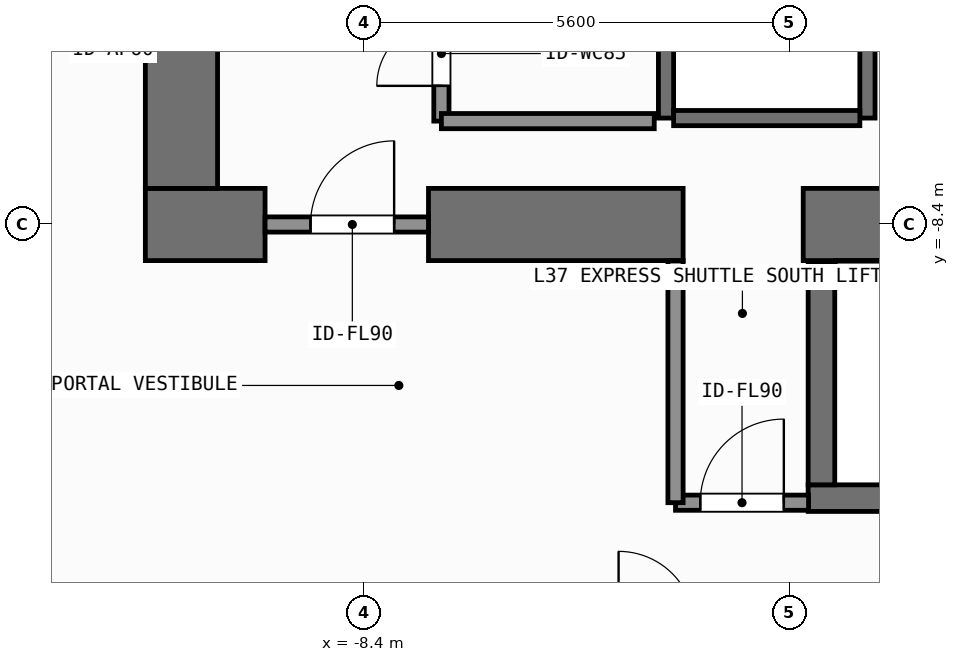
"""IFC4 building model, lengths in metres.
Left out: names, types, materials, properties, quantities, classifications, styles, units other than length and angle.
Written with IfcOpenShell. Run it as: python <this file> out.ifc"""

import sys

from ifc_helpers import new_model, si_unit, direction, frame, frame_2d, origin, place, context, subcontext, project, spatial, rectangle, extrude, element, fill, save


model = new_model("IFC4")
c1 = context("Model", 3, precision=1e-05, world=origin(), true_north=direction((0.0, 1.0)))
c2 = subcontext(c1, "Body", "Model", "MODEL_VIEW")
j1 = project(units=[si_unit("LENGTHUNIT", "METRE"), si_unit("PLANEANGLEUNIT", "RADIAN")], contexts=[c1])
p1 = place(None, origin())
s1 = spatial("IfcSite", under=j1, at=p1, CompositionType="ELEMENT")
p2 = place(p1, origin())
s2 = spatial("IfcBuilding", under=s1, at=p2, CompositionType="ELEMENT")
p3 = place(p2, frame((0.0, 0.0, 148.5)))
s3 = spatial("IfcBuildingStorey", under=s2, at=p3, CompositionType="ELEMENT", Elevation=148.5)
p4 = place(p3, frame((-11.275, -8.4, 0.0), z_axis=(0.0, 0.0, 1.0), x_axis=(1.0, 0.0, 0.0)))
e1 = element("IfcWall", 1, at=p4, inside=s3, PredefinedType="SHEAR", context=c2, shape_type="SweptSolid", body=[
    extrude(rectangle(XDim=1.575, YDim=0.95, at=frame_2d((0.788, 0.0))), origin(), (0.0, 0.0, 1.0), 3.9),
])
p5 = place(p3, frame((-7.55, -8.4, 0.0), z_axis=(0.0, 0.0, 1.0), x_axis=(1.0, 0.0, 0.0)))
e2 = element("IfcWall", 2, at=p5, inside=s3, PredefinedType="SHEAR", context=c2, shape_type="SweptSolid", body=[
    extrude(rectangle(XDim=3.35, YDim=0.95, at=frame_2d((1.675, 0.0))), origin(), (0.0, 0.0, 1.0), 3.9),
])
p6 = place(p3, frame((-2.62, -8.4, 0.0), z_axis=(0.0, 0.0, 1.0), x_axis=(1.0, 0.0, 0.0)))
e3 = element("IfcWall", 3, at=p6, inside=s3, PredefinedType="SHEAR", context=c2, shape_type="SweptSolid", body=[
    extrude(rectangle(XDim=7.27, YDim=0.95, at=frame_2d((3.635, 0.0))), origin(), (0.0, 0.0, 1.0), 3.9),
])
p7 = place(p3, frame((-10.8, -7.925, 0.0), z_axis=(0.0, 0.0, 1.0), x_axis=(0.0, 1.0, 0.0)))
e4 = element("IfcWall", 4, at=p7, inside=s3, PredefinedType="SHEAR", context=c2, shape_type="SweptSolid", body=[
    extrude(rectangle(XDim=15.85, YDim=0.95, at=frame_2d((7.925, 0.0))), origin(), (0.0, 0.0, 1.0), 3.9),
])
p8 = place(p3, frame((-2.555, -12.0, 0.0), z_axis=(0.0, 0.0, 1.0), x_axis=(1.0, 0.0, 0.0)))
e5 = element("IfcWall", 5, at=p8, inside=s3, PredefinedType="SHEAR", context=c2, shape_type="SweptSolid", body=[
    extrude(rectangle(XDim=7.31, YDim=0.35, at=frame_2d((3.655, 0.0))), origin(), (0.0, 0.0, 1.0), 3.9),
])
p9 = place(p3, frame((-2.2, -8.95, 0.0), z_axis=(0.0, 0.0, 1.0), x_axis=(1.0, 0.0, 0.0)))
e6 = element("IfcWall", 6, at=p9, inside=s3, PredefinedType="SHEAR", context=c2, shape_type="SweptSolid", body=[
    extrude(rectangle(XDim=6.6, YDim=0.15, at=frame_2d((3.3, 0.0))), origin(), (0.0, 0.0, 1.0), 3.9),
])
p10 = place(p3, frame((-2.38, -11.825, 0.0), z_axis=(0.0, 0.0, 1.0), x_axis=(0.0, 1.0, 0.0)))
e7 = element("IfcWall", 7, at=p10, inside=s3, PredefinedType="SHEAR", context=c2, shape_type="SweptSolid", body=[
    extrude(rectangle(XDim=2.925, YDim=0.35, at=frame_2d((1.462, 0.0))), origin(), (0.0, 0.0, 1.0), 3.9),
])
for number, where, z_axis, x_axis in (
    (8, (-4.425, -7.0, 0.0), (0.0, 0.0, 1.0), (0.0, 1.0, 0.0)),
    (9, (-1.775, -7.0, 0.0), (0.0, 0.0, 1.0), (0.0, 1.0, 0.0)),
):
    element("IfcWall", number, at=place(p3, frame(where, z_axis=z_axis, x_axis=x_axis)), inside=s3, PredefinedType="SHEAR", context=c2, shape_type="SweptSolid", body=[
        extrude(rectangle(XDim=2.8, YDim=0.2, at=frame_2d((1.4, 0.0))), origin(), (0.0, 0.0, 1.0), 3.68),
    ])
p11 = place(p3, frame((-4.325, -7.0, 0.0), z_axis=(0.0, 0.0, 1.0), x_axis=(1.0, 0.0, 0.0)))
e10 = element("IfcWall", 10, at=p11, inside=s3, PredefinedType="SHEAR", context=c2, shape_type="SweptSolid", body=[
    extrude(rectangle(XDim=2.45, YDim=0.2, at=frame_2d((1.225, 0.0))), origin(), (0.0, 0.0, 1.0), 3.68),
])
p12 = place(p3, frame((-9.7, -8.4, 0.0), z_axis=(0.0, 0.0, 1.0), x_axis=(1.0, 0.0, 0.0)))
e11 = element("IfcWall", 11, at=p12, inside=s3, PredefinedType="SOLIDWALL", context=c2, shape_type="SweptSolid", body=[
    extrude(rectangle(XDim=2.15, YDim=0.2, at=frame_2d((1.075, 0.0))), origin(), (0.0, 0.0, 1.0), 2.72),
])
p13 = place(p12, frame((0.598, 0.0, 0.0)))
e12 = element("IfcOpeningElement", 12, at=p13, cuts=e11, PredefinedType="OPENING", context=c2, shape_type="SweptSolid", body=[
    extrude(rectangle(XDim=1.1, YDim=2.15, at=frame_2d((0.55, 1.075))), frame((0.0, 0.11, 0.0), z_axis=(0.0, -1.0, 0.0), x_axis=(1.0, 0.0, 0.0)), (0.0, 0.0, 1.0), 0.22),
])
p14 = place(p3, frame((-4.3, -12.06, 0.0), z_axis=(0.0, 0.0, 1.0), x_axis=(1.0, 0.0, 0.0)))
e13 = element("IfcWall", 13, at=p14, inside=s3, PredefinedType="SOLIDWALL", context=c2, shape_type="SweptSolid", body=[
    extrude(rectangle(XDim=1.75, YDim=0.2, at=frame_2d((0.875, 0.0))), origin(), (0.0, 0.0, 1.0), 3.68),
])
p15 = place(p14, frame((0.325, 0.0, 0.0)))
e14 = element("IfcOpeningElement", 14, at=p15, cuts=e13, PredefinedType="OPENING", context=c2, shape_type="SweptSolid", body=[
    extrude(rectangle(XDim=1.1, YDim=2.15, at=frame_2d((0.55, 1.075))), frame((0.0, 0.11, 0.0), z_axis=(0.0, -1.0, 0.0), x_axis=(1.0, 0.0, 0.0)), (0.0, 0.0, 1.0), 0.22),
])
p16 = place(p3, frame((-7.38, -7.04, 0.0), z_axis=(0.0, 0.0, 1.0), x_axis=(0.0, 1.0, 0.0)))
e15 = element("IfcWall", 15, at=p16, inside=s3, PredefinedType="SOLIDWALL", context=c2, shape_type="SweptSolid", body=[
    extrude(rectangle(XDim=1.93, YDim=0.2, at=frame_2d((0.965, 0.0))), origin(), (0.0, 0.0, 1.0), 3.68),
])
p17 = place(p16, frame((0.464, 0.0, 0.0)))
e16 = element("IfcOpeningElement", 16, at=p17, cuts=e15, PredefinedType="OPENING", context=c2, shape_type="SweptSolid", body=[
    extrude(rectangle(XDim=0.85, YDim=2.1, at=frame_2d((0.425, 1.05))), frame((0.0, 0.11, 0.0), z_axis=(0.0, -1.0, 0.0), x_axis=(1.0, 0.0, 0.0)), (0.0, 0.0, 1.0), 0.22),
])
p18 = place(p3, frame((-4.3, -12.06, 0.0), z_axis=(0.0, 0.0, 1.0), x_axis=(0.0, 1.0, 0.0)))
e17 = element("IfcWall", 17, at=p18, inside=s3, PredefinedType="SOLIDWALL", context=c2, shape_type="SweptSolid", body=[
    extrude(rectangle(XDim=3.185, YDim=0.2, at=frame_2d((1.593, 0.0))), origin(), (0.0, 0.0, 1.0), 3.68),
])
p19 = place(p3, frame((-7.38, -7.04, 0.0), z_axis=(0.0, 0.0, 1.0), x_axis=(1.0, 0.0, 0.0)))
e18 = element("IfcWall", 18, at=p19, inside=s3, PredefinedType="SOLIDWALL", context=c2, shape_type="SweptSolid", body=[
    extrude(rectangle(XDim=2.8, YDim=0.2, at=frame_2d((1.4, 0.0))), origin(), (0.0, 0.0, 1.0), 3.68),
])
p20 = place(p13, origin())
e19 = element("IfcDoor", 19, at=p20, inside=s3, OperationType="SINGLE_SWING_RIGHT", PredefinedType="DOOR", context=c2, shape_type="SweptSolid", body=[
    extrude(rectangle(XDim=1.1, YDim=2.15, at=frame_2d((0.55, 1.075))), frame((0.0, 0.025, 0.0), z_axis=(0.0, -1.0, 0.0), x_axis=(1.0, 0.0, 0.0)), (0.0, 0.0, 1.0), 0.05),
])
fill(e12, e19)
p21 = place(p15, origin())
e20 = element("IfcDoor", 20, at=p21, inside=s3, OperationType="SINGLE_SWING_RIGHT", PredefinedType="DOOR", context=c2, shape_type="SweptSolid", body=[
    extrude(rectangle(XDim=1.1, YDim=2.15, at=frame_2d((0.55, 1.075))), frame((0.0, 0.025, 0.0), z_axis=(0.0, -1.0, 0.0), x_axis=(1.0, 0.0, 0.0)), (0.0, 0.0, 1.0), 0.05),
])
fill(e14, e20)
p22 = place(p17, origin())
e21 = element("IfcDoor", 21, at=p22, inside=s3, OperationType="SINGLE_SWING_LEFT", PredefinedType="DOOR", context=c2, shape_type="SweptSolid", body=[
    extrude(rectangle(XDim=0.85, YDim=2.1, at=frame_2d((0.425, 1.05))), frame((0.0, 0.025, 0.0), z_axis=(0.0, -1.0, 0.0), x_axis=(1.0, 0.0, 0.0)), (0.0, 0.0, 1.0), 0.05),
])
fill(e16, e21)
save(model, sys.argv[1])
